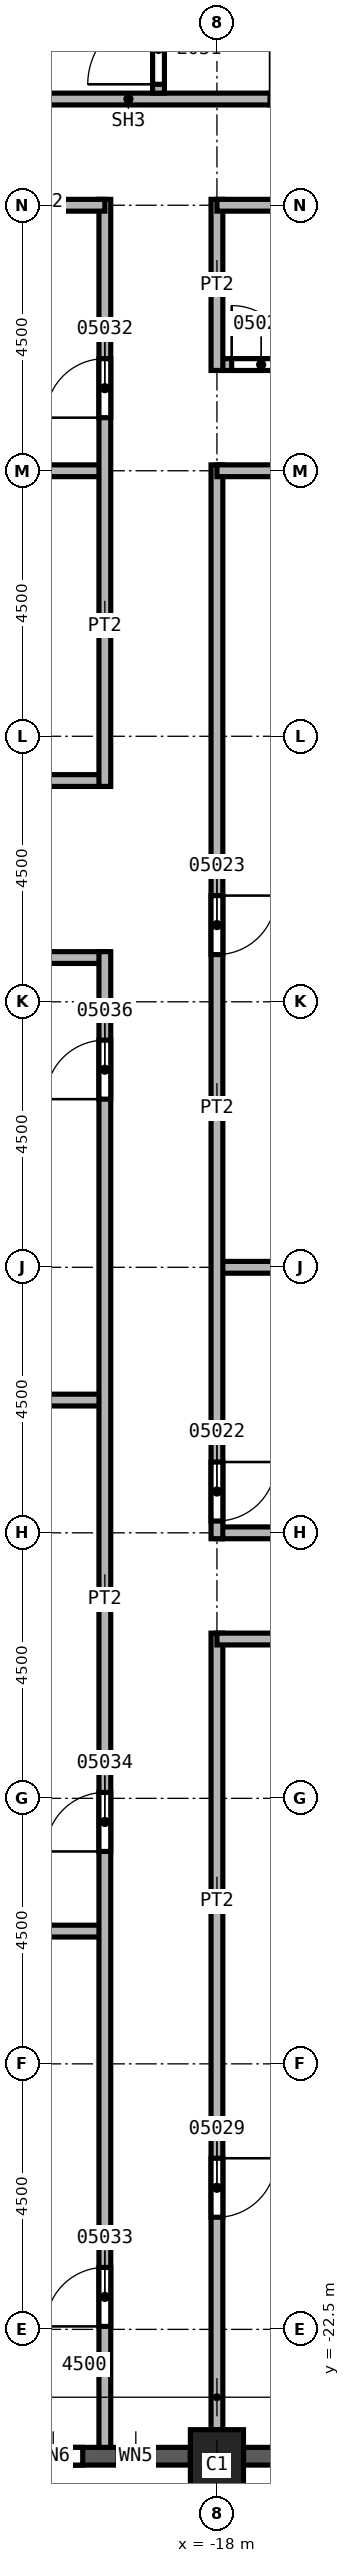
"""IFC4 building model, lengths in metres.
Left out: names, types, materials, properties, quantities, classifications, styles, units other than length and angle.
Written with IfcOpenShell. Run it as: python <this file> out.ifc"""

import sys

from ifc_helpers import new_model, si_unit, direction, frame, frame_2d, origin, origin_2d, place, context, subcontext, project, spatial, rectangle, extrude, element, fill, save


model = new_model("IFC4")
c1 = context("Model", 3, precision=1e-05, world=origin(), true_north=direction((0.0, 1.0)))
c2 = subcontext(c1, "Body", "Model", "MODEL_VIEW")
j1 = project(units=[si_unit("LENGTHUNIT", "METRE"), si_unit("PLANEANGLEUNIT", "RADIAN")], contexts=[c1])
p1 = place(None, origin())
s1 = spatial("IfcSite", under=j1, at=p1, CompositionType="ELEMENT")
p2 = place(p1, origin())
s2 = spatial("IfcBuilding", under=s1, at=p2, CompositionType="ELEMENT")
p3 = place(p2, frame((0.0, 0.0, 116.0)))
s3 = spatial("IfcBuildingStorey", under=s2, at=p3, CompositionType="ELEMENT", Elevation=116.0)
p4 = place(p3, frame((-18.0, -24.8, 0.0), z_axis=(0.0, 0.0, 1.0), x_axis=(1.0, 0.0, 0.0)))
e1 = element("IfcColumn", 1, at=p4, inside=s3, PredefinedType="COLUMN", context=c2, shape_type="SweptSolid", body=[
    extrude(rectangle(XDim=0.9, YDim=1.2, at=origin_2d()), origin(), (0.0, 0.0, 1.0), 3.6),
])
p5 = place(p3, frame((-22.05, -24.65, 0.0), z_axis=(0.0, 0.0, 1.0), x_axis=(1.0, 0.0, 0.0)))
e2 = element("IfcWall", 2, at=p5, inside=s3, PredefinedType="SOLIDWALL", context=c2, shape_type="SweptSolid", body=[
    extrude(rectangle(XDim=3.6, YDim=0.3, at=frame_2d((1.8, 0.0))), origin(), (0.0, 0.0, 1.0), 3.0),
])
p6 = place(p5, frame((0.775, 0.0, 0.8)))
e3 = element("IfcOpeningElement", 3, at=p6, cuts=e2, PredefinedType="OPENING", context=c2, shape_type="SweptSolid", body=[
    extrude(rectangle(XDim=1.0, YDim=1.95, at=frame_2d((0.5, 0.975))), frame((0.0, 0.15, 0.0), z_axis=(0.0, -1.0, 0.0), x_axis=(1.0, 0.0, 0.0)), (0.0, 0.0, 1.0), 0.3),
])
p7 = place(p5, frame((2.375, 0.0, 0.8)))
e4 = element("IfcOpeningElement", 4, at=p7, cuts=e2, PredefinedType="OPENING", context=c2, shape_type="SweptSolid", body=[
    extrude(rectangle(XDim=0.6, YDim=1.95, at=frame_2d((0.3, 0.975))), frame((0.0, 0.15, 0.0), z_axis=(0.0, -1.0, 0.0), x_axis=(1.0, 0.0, 0.0)), (0.0, 0.0, 1.0), 0.3),
])
p8 = place(p3, frame((-17.55, -24.65, 0.0), z_axis=(0.0, 0.0, 1.0), x_axis=(1.0, 0.0, 0.0)))
e5 = element("IfcWall", 5, at=p8, inside=s3, PredefinedType="SOLIDWALL", context=c2, shape_type="SweptSolid", body=[
    extrude(rectangle(XDim=3.6, YDim=0.3, at=frame_2d((1.8, 0.0))), origin(), (0.0, 0.0, 1.0), 3.0),
])
p9 = place(p8, frame((0.6, 0.0, 0.8)))
e6 = element("IfcOpeningElement", 6, at=p9, cuts=e5, PredefinedType="OPENING", context=c2, shape_type="SweptSolid", body=[
    extrude(rectangle(XDim=2.4, YDim=1.95, at=frame_2d((1.2, 0.975))), frame((0.0, 0.15, 0.0), z_axis=(0.0, -1.0, 0.0), x_axis=(1.0, 0.0, 0.0)), (0.0, 0.0, 1.0), 0.3),
])
p10 = place(p3, frame((-33.85, 3.75, 0.0), z_axis=(0.0, 0.0, 1.0), x_axis=(1.0, 0.0, 0.0)))
e7 = element("IfcWall", 7, at=p10, inside=s3, PredefinedType="PARTITIONING", context=c2, shape_type="SweptSolid", body=[
    extrude(rectangle(XDim=13.95, YDim=0.2, at=frame_2d((6.975, 0.0))), origin(), (0.0, 0.0, 1.0), 3.6),
])
p11 = place(p10, frame((9.85, 0.0, 0.0)))
e8 = element("IfcOpeningElement", 8, at=p11, cuts=e7, PredefinedType="OPENING", context=c2, shape_type="SweptSolid", body=[
    extrude(rectangle(XDim=1.0, YDim=2.1, at=frame_2d((0.5, 1.05))), frame((0.0, 0.1, 0.0), z_axis=(0.0, -1.0, 0.0), x_axis=(1.0, 0.0, 0.0)), (0.0, 0.0, 1.0), 0.2),
])
for number, where, z_axis, x_axis in (
    (9, (-27.1, -15.75, 0.0), (0.0, 0.0, 1.0), (1.0, 0.0, 0.0)),
    (10, (-27.1, -6.75, 0.0), (0.0, 0.0, 1.0), (1.0, 0.0, 0.0)),
    (11, (-27.1, 9.0, 0.0), (0.0, 0.0, 1.0), (1.0, 0.0, 0.0)),
):
    element("IfcWall", number, at=place(p3, frame(where, z_axis=z_axis, x_axis=x_axis)), inside=s3, PredefinedType="PARTITIONING", context=c2, shape_type="SweptSolid", body=[
        extrude(rectangle(XDim=7.2, YDim=0.2, at=frame_2d((3.6, 0.0))), origin(), (0.0, 0.0, 1.0), 3.6),
    ])
p12 = place(p3, frame((-19.9, 0.75, 0.0), z_axis=(0.0, 0.0, 1.0), x_axis=(-1.0, 0.0, 0.0)))
e12 = element("IfcWall", 12, at=p12, inside=s3, PredefinedType="PARTITIONING", context=c2, shape_type="SweptSolid", body=[
    extrude(rectangle(XDim=13.95, YDim=0.2, at=frame_2d((6.975, 0.0))), origin(), (0.0, 0.0, 1.0), 3.6),
])
p13 = place(p3, frame((-19.9, -24.5, 0.0), z_axis=(0.0, 0.0, 1.0), x_axis=(0.0, 1.0, 0.0)))
e13 = element("IfcWall", 13, at=p13, inside=s3, PredefinedType="PARTITIONING", context=c2, shape_type="SweptSolid", body=[
    extrude(rectangle(XDim=25.35, YDim=0.2, at=frame_2d((12.675, 0.0))), origin(), (0.0, 0.0, 1.0), 3.6),
])
p14 = place(p13, frame((2.05, 0.0, 0.0)))
e14 = element("IfcOpeningElement", 14, at=p14, cuts=e13, PredefinedType="OPENING", context=c2, shape_type="SweptSolid", body=[
    extrude(rectangle(XDim=1.0, YDim=2.1, at=frame_2d((0.5, 1.05))), frame((0.0, 0.1, 0.0), z_axis=(0.0, -1.0, 0.0), x_axis=(1.0, 0.0, 0.0)), (0.0, 0.0, 1.0), 0.2),
])
p15 = place(p13, frame((10.1, 0.0, 0.0)))
e15 = element("IfcOpeningElement", 15, at=p15, cuts=e13, PredefinedType="OPENING", context=c2, shape_type="SweptSolid", body=[
    extrude(rectangle(XDim=1.0, YDim=2.1, at=frame_2d((0.5, 1.05))), frame((0.0, 0.1, 0.0), z_axis=(0.0, -1.0, 0.0), x_axis=(1.0, 0.0, 0.0)), (0.0, 0.0, 1.0), 0.2),
])
p16 = place(p13, frame((22.85, 0.0, 0.0)))
e16 = element("IfcOpeningElement", 16, at=p16, cuts=e13, PredefinedType="OPENING", context=c2, shape_type="SweptSolid", body=[
    extrude(rectangle(XDim=1.0, YDim=2.1, at=frame_2d((0.5, 1.05))), frame((0.0, 0.1, 0.0), z_axis=(0.0, -1.0, 0.0), x_axis=(1.0, 0.0, 0.0)), (0.0, 0.0, 1.0), 0.2),
])
p17 = place(p3, frame((-19.9, 3.65, 0.0), z_axis=(0.0, 0.0, 1.0), x_axis=(0.0, 1.0, 0.0)))
e17 = element("IfcWall", 17, at=p17, inside=s3, PredefinedType="PARTITIONING", context=c2, shape_type="SweptSolid", body=[
    extrude(rectangle(XDim=9.95, YDim=0.2, at=frame_2d((4.975, 0.0))), origin(), (0.0, 0.0, 1.0), 3.6),
])
p18 = place(p17, frame((6.25, 0.0, 0.0)))
e18 = element("IfcOpeningElement", 18, at=p18, cuts=e17, PredefinedType="OPENING", context=c2, shape_type="SweptSolid", body=[
    extrude(rectangle(XDim=1.0, YDim=2.1, at=frame_2d((0.5, 1.05))), frame((0.0, 0.1, 0.0), z_axis=(0.0, -1.0, 0.0), x_axis=(1.0, 0.0, 0.0)), (0.0, 0.0, 1.0), 0.2),
])
p19 = place(p3, frame((-19.9, 13.5, 0.0), z_axis=(0.0, 0.0, 1.0), x_axis=(-1.0, 0.0, 0.0)))
e19 = element("IfcWall", 19, at=p19, inside=s3, PredefinedType="PARTITIONING", context=c2, shape_type="SweptSolid", body=[
    extrude(rectangle(XDim=2.1, YDim=0.2, at=frame_2d((1.05, 0.0))), origin(), (0.0, 0.0, 1.0), 3.6),
])
p20 = place(p3, frame((-18.0, -10.7, 0.0), z_axis=(0.0, 0.0, 1.0), x_axis=(0.0, -1.0, 0.0)))
e20 = element("IfcWall", 20, at=p20, inside=s3, PredefinedType="PARTITIONING", context=c2, shape_type="SweptSolid", body=[
    extrude(rectangle(XDim=13.5, YDim=0.2, at=frame_2d((6.75, 0.0))), origin(), (0.0, 0.0, 1.0), 3.6),
])
p21 = place(p20, frame((8.9, 0.0, 0.0)))
e21 = element("IfcOpeningElement", 21, at=p21, cuts=e20, PredefinedType="OPENING", context=c2, shape_type="SweptSolid", body=[
    extrude(rectangle(XDim=1.0, YDim=2.1, at=frame_2d((0.5, 1.05))), frame((0.0, 0.1, 0.0), z_axis=(0.0, -1.0, 0.0), x_axis=(1.0, 0.0, 0.0)), (0.0, 0.0, 1.0), 0.2),
])
for number, where, z_axis, x_axis in (
    (22, (-18.0, -9.0, 0.0), (0.0, 0.0, 1.0), (1.0, 0.0, 0.0)),
    (23, (-18.0, -4.5, 0.0), (0.0, 0.0, 1.0), (1.0, 0.0, 0.0)),
):
    element("IfcWall", number, at=place(p3, frame(where, z_axis=z_axis, x_axis=x_axis)), inside=s3, PredefinedType="PARTITIONING", context=c2, shape_type="SweptSolid", body=[
        extrude(rectangle(XDim=4.5, YDim=0.2, at=frame_2d((2.25, 0.0))), origin(), (0.0, 0.0, 1.0), 3.6),
    ])
p22 = place(p3, frame((-18.0, 9.1, 0.0), z_axis=(0.0, 0.0, 1.0), x_axis=(0.0, -1.0, 0.0)))
e24 = element("IfcWall", 24, at=p22, inside=s3, PredefinedType="PARTITIONING", context=c2, shape_type="SweptSolid", body=[
    extrude(rectangle(XDim=18.2, YDim=0.2, at=frame_2d((9.1, 0.0))), origin(), (0.0, 0.0, 1.0), 3.6),
])
p23 = place(p22, frame((16.9, 0.0, 0.0)))
e25 = element("IfcOpeningElement", 25, at=p23, cuts=e24, PredefinedType="OPENING", context=c2, shape_type="SweptSolid", body=[
    extrude(rectangle(XDim=1.0, YDim=2.1, at=frame_2d((0.5, 1.05))), frame((0.0, 0.1, 0.0), z_axis=(0.0, -1.0, 0.0), x_axis=(1.0, 0.0, 0.0)), (0.0, 0.0, 1.0), 0.2),
])
p24 = place(p22, frame((7.3, 0.0, 0.0)))
e26 = element("IfcOpeningElement", 26, at=p24, cuts=e24, PredefinedType="OPENING", context=c2, shape_type="SweptSolid", body=[
    extrude(rectangle(XDim=1.0, YDim=2.1, at=frame_2d((0.5, 1.05))), frame((0.0, 0.1, 0.0), z_axis=(0.0, -1.0, 0.0), x_axis=(1.0, 0.0, 0.0)), (0.0, 0.0, 1.0), 0.2),
])
p25 = place(p3, frame((-18.0, 10.8, 0.0), z_axis=(0.0, 0.0, 1.0), x_axis=(1.0, 0.0, 0.0)))
e27 = element("IfcWall", 27, at=p25, inside=s3, PredefinedType="PARTITIONING", context=c2, shape_type="SweptSolid", body=[
    extrude(rectangle(XDim=3.6, YDim=0.2, at=frame_2d((1.8, 0.0))), origin(), (0.0, 0.0, 1.0), 3.6),
])
p26 = place(p25, frame((0.25, 0.0, 0.0)))
e28 = element("IfcOpeningElement", 28, at=p26, cuts=e27, PredefinedType="OPENING", context=c2, shape_type="SweptSolid", body=[
    extrude(rectangle(XDim=1.0, YDim=2.1, at=frame_2d((0.5, 1.05))), frame((0.0, 0.1, 0.0), z_axis=(0.0, -1.0, 0.0), x_axis=(1.0, 0.0, 0.0)), (0.0, 0.0, 1.0), 0.2),
])
p27 = place(p3, frame((-18.0, 13.6, 0.0), z_axis=(0.0, 0.0, 1.0), x_axis=(0.0, -1.0, 0.0)))
e29 = element("IfcWall", 29, at=p27, inside=s3, PredefinedType="PARTITIONING", context=c2, shape_type="SweptSolid", body=[
    extrude(rectangle(XDim=2.9, YDim=0.2, at=frame_2d((1.45, 0.0))), origin(), (0.0, 0.0, 1.0), 3.6),
])
p28 = place(p3, frame((-15.3, 13.5, 0.0), z_axis=(0.0, 0.0, 1.0), x_axis=(-1.0, 0.0, 0.0)))
e30 = element("IfcWall", 30, at=p28, inside=s3, PredefinedType="PARTITIONING", context=c2, shape_type="SweptSolid", body=[
    extrude(rectangle(XDim=2.7, YDim=0.2, at=frame_2d((1.35, 0.0))), origin(), (0.0, 0.0, 1.0), 3.6),
])
p29 = place(p3, frame((-14.4, -10.8, 0.0), z_axis=(0.0, 0.0, 1.0), x_axis=(-1.0, 0.0, 0.0)))
e31 = element("IfcWall", 31, at=p29, inside=s3, PredefinedType="PARTITIONING", context=c2, shape_type="SweptSolid", body=[
    extrude(rectangle(XDim=3.6, YDim=0.2, at=frame_2d((1.8, 0.0))), origin(), (0.0, 0.0, 1.0), 3.6),
])
p30 = place(p3, frame((-13.5, 9.0, 0.0), z_axis=(0.0, 0.0, 1.0), x_axis=(-1.0, 0.0, 0.0)))
e32 = element("IfcWall", 32, at=p30, inside=s3, PredefinedType="PARTITIONING", context=c2, shape_type="SweptSolid", body=[
    extrude(rectangle(XDim=4.5, YDim=0.2, at=frame_2d((2.25, 0.0))), origin(), (0.0, 0.0, 1.0), 3.6),
])
p31 = place(p3, frame((-21.9, 15.3, 0.0), z_axis=(0.0, 0.0, 1.0), x_axis=(1.0, 0.0, 0.0)))
e33 = element("IfcWall", 33, at=p31, inside=s3, PredefinedType="SOLIDWALL", context=c2, shape_type="SweptSolid", body=[
    extrude(rectangle(XDim=8.275, YDim=0.2, at=frame_2d((4.137, 0.0))), origin(), (0.0, 0.0, 1.0), 3.6),
])
p32 = place(p31, frame((4.8, 0.0, 0.0)))
e34 = element("IfcOpeningElement", 34, at=p32, cuts=e33, PredefinedType="OPENING", context=c2, shape_type="SweptSolid", body=[
    extrude(rectangle(XDim=1.2, YDim=2.1, at=frame_2d((0.6, 1.05))), frame((0.0, 0.1, 0.0), z_axis=(0.0, -1.0, 0.0), x_axis=(1.0, 0.0, 0.0)), (0.0, 0.0, 1.0), 0.2),
])
p33 = place(p3, frame((-18.99, 15.4, 0.0), z_axis=(0.0, 0.0, 1.0), x_axis=(0.0, 1.0, 0.0)))
e35 = element("IfcWall", 35, at=p33, inside=s3, PredefinedType="SOLIDWALL", context=c2, shape_type="SweptSolid", body=[
    extrude(rectangle(XDim=5.9, YDim=0.2, at=frame_2d((2.95, 0.0))), origin(), (0.0, 0.0, 1.0), 3.6),
])
p34 = place(p33, frame((0.15, 0.0, 0.0)))
e36 = element("IfcOpeningElement", 36, at=p34, cuts=e35, PredefinedType="OPENING", context=c2, shape_type="SweptSolid", body=[
    extrude(rectangle(XDim=1.2, YDim=2.1, at=frame_2d((0.6, 1.05))), frame((0.0, 0.1, 0.0), z_axis=(0.0, -1.0, 0.0), x_axis=(1.0, 0.0, 0.0)), (0.0, 0.0, 1.0), 0.2),
])
p35 = place(p23, origin())
e37 = element("IfcDoor", 37, at=p35, inside=s3, OperationType="SINGLE_SWING_LEFT", PredefinedType="DOOR", context=c2, shape_type="SweptSolid", body=[
    extrude(rectangle(XDim=1.0, YDim=2.1, at=frame_2d((0.5, 1.05))), frame((0.0, 0.025, 0.0), z_axis=(0.0, -1.0, 0.0), x_axis=(1.0, 0.0, 0.0)), (0.0, 0.0, 1.0), 0.05),
])
fill(e25, e37)
p36 = place(p24, origin())
e38 = element("IfcDoor", 38, at=p36, inside=s3, OperationType="SINGLE_SWING_RIGHT", PredefinedType="DOOR", context=c2, shape_type="SweptSolid", body=[
    extrude(rectangle(XDim=1.0, YDim=2.1, at=frame_2d((0.5, 1.05))), frame((0.0, 0.025, 0.0), z_axis=(0.0, -1.0, 0.0), x_axis=(1.0, 0.0, 0.0)), (0.0, 0.0, 1.0), 0.05),
])
fill(e26, e38)
p37 = place(p26, origin())
e39 = element("IfcDoor", 39, at=p37, inside=s3, OperationType="SINGLE_SWING_RIGHT", PredefinedType="DOOR", context=c2, shape_type="SweptSolid", body=[
    extrude(rectangle(XDim=1.0, YDim=2.1, at=frame_2d((0.5, 1.05))), frame((0.0, 0.025, 0.0), z_axis=(0.0, -1.0, 0.0), x_axis=(1.0, 0.0, 0.0)), (0.0, 0.0, 1.0), 0.05),
])
fill(e28, e39)
p38 = place(p21, origin())
e40 = element("IfcDoor", 40, at=p38, inside=s3, OperationType="SINGLE_SWING_RIGHT", PredefinedType="DOOR", context=c2, shape_type="SweptSolid", body=[
    extrude(rectangle(XDim=1.0, YDim=2.1, at=frame_2d((0.5, 1.05))), frame((0.0, 0.025, 0.0), z_axis=(0.0, -1.0, 0.0), x_axis=(1.0, 0.0, 0.0)), (0.0, 0.0, 1.0), 0.05),
])
fill(e21, e40)
p39 = place(p18, origin())
e41 = element("IfcDoor", 41, at=p39, inside=s3, OperationType="SINGLE_SWING_LEFT", PredefinedType="DOOR", context=c2, shape_type="SweptSolid", body=[
    extrude(rectangle(XDim=1.0, YDim=2.1, at=frame_2d((0.5, 1.05))), frame((0.0, 0.025, 0.0), z_axis=(0.0, -1.0, 0.0), x_axis=(1.0, 0.0, 0.0)), (0.0, 0.0, 1.0), 0.05),
])
fill(e18, e41)
p40 = place(p14, origin())
e42 = element("IfcDoor", 42, at=p40, inside=s3, OperationType="SINGLE_SWING_RIGHT", PredefinedType="DOOR", context=c2, shape_type="SweptSolid", body=[
    extrude(rectangle(XDim=1.0, YDim=2.1, at=frame_2d((0.5, 1.05))), frame((0.0, 0.025, 0.0), z_axis=(0.0, -1.0, 0.0), x_axis=(1.0, 0.0, 0.0)), (0.0, 0.0, 1.0), 0.05),
])
fill(e14, e42)
p41 = place(p15, origin())
e43 = element("IfcDoor", 43, at=p41, inside=s3, OperationType="SINGLE_SWING_LEFT", PredefinedType="DOOR", context=c2, shape_type="SweptSolid", body=[
    extrude(rectangle(XDim=1.0, YDim=2.1, at=frame_2d((0.5, 1.05))), frame((0.0, 0.025, 0.0), z_axis=(0.0, -1.0, 0.0), x_axis=(1.0, 0.0, 0.0)), (0.0, 0.0, 1.0), 0.05),
])
fill(e15, e43)
p42 = place(p16, origin())
e44 = element("IfcDoor", 44, at=p42, inside=s3, OperationType="SINGLE_SWING_LEFT", PredefinedType="DOOR", context=c2, shape_type="SweptSolid", body=[
    extrude(rectangle(XDim=1.0, YDim=2.1, at=frame_2d((0.5, 1.05))), frame((0.0, 0.025, 0.0), z_axis=(0.0, -1.0, 0.0), x_axis=(1.0, 0.0, 0.0)), (0.0, 0.0, 1.0), 0.05),
])
fill(e16, e44)
p43 = place(p34, origin())
e45 = element("IfcDoor", 45, at=p43, inside=s3, OperationType="SINGLE_SWING_LEFT", PredefinedType="DOOR", context=c2, shape_type="SweptSolid", body=[
    extrude(rectangle(XDim=1.2, YDim=2.1, at=frame_2d((0.6, 1.05))), frame((0.0, 0.025, 0.0), z_axis=(0.0, -1.0, 0.0), x_axis=(1.0, 0.0, 0.0)), (0.0, 0.0, 1.0), 0.05),
])
fill(e36, e45)
p44 = place(p6, origin())
e46 = element("IfcWindow", 46, at=p44, inside=s3, PartitioningType="SINGLE_PANEL", PredefinedType="WINDOW", context=c2, shape_type="SweptSolid", body=[
    extrude(rectangle(XDim=1.0, YDim=1.95, at=frame_2d((0.5, 0.975))), frame((0.0, 0.03, 0.0), z_axis=(0.0, -1.0, 0.0), x_axis=(1.0, 0.0, 0.0)), (0.0, 0.0, 1.0), 0.06),
])
fill(e3, e46)
p45 = place(p7, origin())
e47 = element("IfcWindow", 47, at=p45, inside=s3, PartitioningType="SINGLE_PANEL", PredefinedType="WINDOW", context=c2, shape_type="SweptSolid", body=[
    extrude(rectangle(XDim=0.6, YDim=1.95, at=frame_2d((0.3, 0.975))), frame((0.0, 0.03, 0.0), z_axis=(0.0, -1.0, 0.0), x_axis=(1.0, 0.0, 0.0)), (0.0, 0.0, 1.0), 0.06),
])
fill(e4, e47)
save(model, sys.argv[1])
